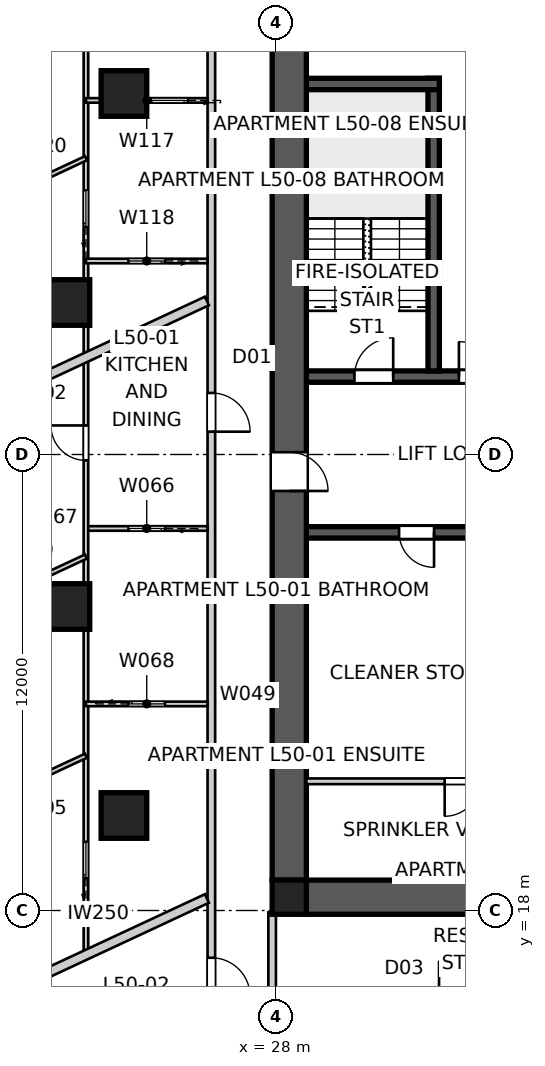
"""IFC4 building model, lengths in metres.
Left out: names, types, materials, properties, quantities, classifications, styles, units other than length and angle.
Written with IfcOpenShell. Run it as: python <this file> out.ifc"""

import sys

from ifc_helpers import new_model, si_unit, direction, frame, frame_2d, origin, origin_2d, place, context, subcontext, project, spatial, polyline, rectangle, outline, extrude, element, fill, save


model = new_model("IFC4")
c1 = context("Model", 3, precision=1e-05, world=origin(), true_north=direction((0.0, 1.0)))
c2 = subcontext(c1, "Body", "Model", "MODEL_VIEW")
j1 = project(units=[si_unit("LENGTHUNIT", "METRE"), si_unit("PLANEANGLEUNIT", "RADIAN")], contexts=[c1])
p1 = place(None, origin())
s1 = spatial("IfcSite", under=j1, at=p1, CompositionType="ELEMENT")
p2 = place(p1, origin())
s2 = spatial("IfcBuilding", under=s1, at=p2, CompositionType="ELEMENT")
p3 = place(p2, frame((0.0, 0.0, 182.8)))
s3 = spatial("IfcBuildingStorey", under=s2, at=p3, CompositionType="ELEMENT", Elevation=182.8)
p4 = place(p3, frame((51.2, 18.35, 0.0), z_axis=(0.0, 0.0, 1.0), x_axis=(-1.0, 0.0, 0.0)))
e1 = element("IfcWall", 1, at=p4, inside=s3, PredefinedType="SHEAR", context=c2, shape_type="SweptSolid", body=[
    extrude(outline(polyline([(0.0, -0.45), (22.4, -0.45), (22.4, -0.025), (22.85, -0.025), (22.85, 0.025), (22.4, 0.025), (22.4, 0.45), (0.0, 0.45), (0.0, 0.025), (-0.45, 0.025), (-0.45, -0.025), (0.0, -0.025), (0.0, -0.45)])), origin(), (0.0, 0.0, 1.0), 3.4),
])
p5 = place(p3, frame((28.35, 41.2, 0.0), z_axis=(0.0, 0.0, 1.0), x_axis=(0.0, -1.0, 0.0)))
e2 = element("IfcWall", 2, at=p5, inside=s3, PredefinedType="SHEAR", context=c2, shape_type="SweptSolid", body=[
    extrude(outline(polyline([(0.0, -0.45), (22.4, -0.45), (22.4, -0.025), (22.85, -0.025), (22.85, 0.025), (22.4, 0.025), (22.4, 0.45), (0.0, 0.45), (0.0, 0.025), (-0.45, 0.025), (-0.45, -0.025), (0.0, -0.025), (0.0, -0.45)])), origin(), (0.0, 0.0, 1.0), 3.4),
])
p6 = place(p5, frame((11.14, 0.0, 0.0)))
e3 = element("IfcOpeningElement", 3, at=p6, cuts=e2, PredefinedType="OPENING", context=c2, shape_type="SweptSolid", body=[
    extrude(rectangle(XDim=1.02, YDim=2.4, at=frame_2d((0.51, 1.2))), frame((0.0, 0.46, 0.0), z_axis=(0.0, -1.0, 0.0), x_axis=(1.0, 0.0, 0.0)), (0.0, 0.0, 1.0), 0.92),
])
p7 = place(p3, frame((28.8, 32.05, 0.0), z_axis=(0.0, 0.0, 1.0), x_axis=(1.0, 0.0, 0.0)))
e4 = element("IfcWall", 4, at=p7, inside=s3, PredefinedType="SHEAR", context=c2, shape_type="SweptSolid", body=[
    extrude(rectangle(XDim=22.4, YDim=0.3, at=frame_2d((11.2, 0.0))), origin(), (0.0, 0.0, 1.0), 3.4),
])
p8 = place(p7, frame((19.04, 0.0, 0.0)))
e5 = element("IfcOpeningElement", 5, at=p8, cuts=e4, PredefinedType="OPENING", context=c2, shape_type="SweptSolid", body=[
    extrude(rectangle(XDim=0.92, YDim=2.1, at=frame_2d((0.46, 1.05))), frame((0.0, 0.16, 0.0), z_axis=(0.0, -1.0, 0.0), x_axis=(1.0, 0.0, 0.0)), (0.0, 0.0, 1.0), 0.32),
])
p9 = place(p7, frame((1.265, 0.0, 0.0)))
e6 = element("IfcOpeningElement", 6, at=p9, cuts=e4, PredefinedType="OPENING", context=c2, shape_type="SweptSolid", body=[
    extrude(rectangle(XDim=1.02, YDim=2.1, at=frame_2d((0.51, 1.05))), frame((0.0, 0.16, 0.0), z_axis=(0.0, -1.0, 0.0), x_axis=(1.0, 0.0, 0.0)), (0.0, 0.0, 1.0), 0.32),
])
p10 = place(p7, frame((4.015, 0.0, 0.0)))
e7 = element("IfcOpeningElement", 7, at=p10, cuts=e4, PredefinedType="OPENING", context=c2, shape_type="SweptSolid", body=[
    extrude(rectangle(XDim=0.92, YDim=2.1, at=frame_2d((0.46, 1.05))), frame((0.0, 0.16, 0.0), z_axis=(0.0, -1.0, 0.0), x_axis=(1.0, 0.0, 0.0)), (0.0, 0.0, 1.0), 0.32),
])
p11 = place(p7, frame((7.015, 0.0, 0.0)))
e8 = element("IfcOpeningElement", 8, at=p11, cuts=e4, PredefinedType="OPENING", context=c2, shape_type="SweptSolid", body=[
    extrude(rectangle(XDim=0.92, YDim=2.1, at=frame_2d((0.46, 1.05))), frame((0.0, 0.16, 0.0), z_axis=(0.0, -1.0, 0.0), x_axis=(1.0, 0.0, 0.0)), (0.0, 0.0, 1.0), 0.32),
])
p12 = place(p7, frame((9.34, 0.0, 0.0)))
e9 = element("IfcOpeningElement", 9, at=p12, cuts=e4, PredefinedType="OPENING", context=c2, shape_type="SweptSolid", body=[
    extrude(rectangle(XDim=0.92, YDim=2.1, at=frame_2d((0.46, 1.05))), frame((0.0, 0.16, 0.0), z_axis=(0.0, -1.0, 0.0), x_axis=(1.0, 0.0, 0.0)), (0.0, 0.0, 1.0), 0.32),
])
p13 = place(p7, frame((14.85, 0.0, 0.0)))
e10 = element("IfcOpeningElement", 10, at=p13, cuts=e4, PredefinedType="OPENING", context=c2, shape_type="SweptSolid", body=[
    extrude(rectangle(XDim=1.1, YDim=2.1, at=frame_2d((0.55, 1.05))), frame((0.0, 0.16, 0.0), z_axis=(0.0, -1.0, 0.0), x_axis=(1.0, 0.0, 0.0)), (0.0, 0.0, 1.0), 0.32),
])
p14 = place(p3, frame((51.2, 27.95, 0.0), z_axis=(0.0, 0.0, 1.0), x_axis=(-1.0, 0.0, 0.0)))
e11 = element("IfcWall", 11, at=p14, inside=s3, PredefinedType="SHEAR", context=c2, shape_type="SweptSolid", body=[
    extrude(rectangle(XDim=22.4, YDim=0.3, at=frame_2d((11.2, 0.0))), origin(), (0.0, 0.0, 1.0), 3.4),
])
p15 = place(p14, frame((19.04, 0.0, 0.0)))
e12 = element("IfcOpeningElement", 12, at=p15, cuts=e11, PredefinedType="OPENING", context=c2, shape_type="SweptSolid", body=[
    extrude(rectangle(XDim=0.92, YDim=2.1, at=frame_2d((0.46, 1.05))), frame((0.0, 0.16, 0.0), z_axis=(0.0, -1.0, 0.0), x_axis=(1.0, 0.0, 0.0)), (0.0, 0.0, 1.0), 0.32),
])
p16 = place(p14, frame((1.265, 0.0, 0.0)))
e13 = element("IfcOpeningElement", 13, at=p16, cuts=e11, PredefinedType="OPENING", context=c2, shape_type="SweptSolid", body=[
    extrude(rectangle(XDim=1.02, YDim=2.1, at=frame_2d((0.51, 1.05))), frame((0.0, 0.16, 0.0), z_axis=(0.0, -1.0, 0.0), x_axis=(1.0, 0.0, 0.0)), (0.0, 0.0, 1.0), 0.32),
])
p17 = place(p14, frame((4.015, 0.0, 0.0)))
e14 = element("IfcOpeningElement", 14, at=p17, cuts=e11, PredefinedType="OPENING", context=c2, shape_type="SweptSolid", body=[
    extrude(rectangle(XDim=0.92, YDim=2.1, at=frame_2d((0.46, 1.05))), frame((0.0, 0.16, 0.0), z_axis=(0.0, -1.0, 0.0), x_axis=(1.0, 0.0, 0.0)), (0.0, 0.0, 1.0), 0.32),
])
p18 = place(p14, frame((6.45, 0.0, 0.0)))
e15 = element("IfcOpeningElement", 15, at=p18, cuts=e11, PredefinedType="OPENING", context=c2, shape_type="SweptSolid", body=[
    extrude(rectangle(XDim=1.1, YDim=2.1, at=frame_2d((0.55, 1.05))), frame((0.0, 0.16, 0.0), z_axis=(0.0, -1.0, 0.0), x_axis=(1.0, 0.0, 0.0)), (0.0, 0.0, 1.0), 0.32),
])
p19 = place(p14, frame((9.25, 0.0, 0.0)))
e16 = element("IfcOpeningElement", 16, at=p19, cuts=e11, PredefinedType="OPENING", context=c2, shape_type="SweptSolid", body=[
    extrude(rectangle(XDim=1.1, YDim=2.1, at=frame_2d((0.55, 1.05))), frame((0.0, 0.16, 0.0), z_axis=(0.0, -1.0, 0.0), x_axis=(1.0, 0.0, 0.0)), (0.0, 0.0, 1.0), 0.32),
])
p20 = place(p14, frame((14.85, 0.0, 0.0)))
e17 = element("IfcOpeningElement", 17, at=p20, cuts=e11, PredefinedType="OPENING", context=c2, shape_type="SweptSolid", body=[
    extrude(rectangle(XDim=1.1, YDim=2.1, at=frame_2d((0.55, 1.05))), frame((0.0, 0.16, 0.0), z_axis=(0.0, -1.0, 0.0), x_axis=(1.0, 0.0, 0.0)), (0.0, 0.0, 1.0), 0.32),
])
p21 = place(p3, frame((32.15, 32.2, 0.0), z_axis=(0.0, 0.0, 1.0), x_axis=(0.0, 1.0, 0.0)))
e18 = element("IfcWall", 18, at=p21, inside=s3, PredefinedType="SHEAR", context=c2, shape_type="SweptSolid", body=[
    extrude(rectangle(XDim=7.7, YDim=0.3, at=frame_2d((3.85, 0.0))), origin(), (0.0, 0.0, 1.0), 3.4),
])
p22 = place(p3, frame((28.8, 39.75, 0.0), z_axis=(0.0, 0.0, 1.0), x_axis=(1.0, 0.0, 0.0)))
e19 = element("IfcWall", 19, at=p22, inside=s3, PredefinedType="SHEAR", context=c2, shape_type="SweptSolid", body=[
    extrude(rectangle(XDim=3.5, YDim=0.3, at=frame_2d((1.75, 0.0))), origin(), (0.0, 0.0, 1.0), 3.4),
])
p23 = place(p3, frame((28.35, 18.35, 0.0), z_axis=(0.0, 0.0, 1.0), x_axis=(1.0, 0.0, 0.0)))
e20 = element("IfcColumn", 20, at=p23, inside=s3, PredefinedType="COLUMN", context=c2, shape_type="SweptSolid", body=[
    extrude(rectangle(XDim=0.9, YDim=0.9, at=origin_2d()), origin(), (0.0, 0.0, 1.0), 3.4),
])
for number, where, z_axis, x_axis in (
    (21, (24.0, 39.5, 0.0), (0.0, 0.0, 1.0), (1.0, 0.0, 0.0)),
    (22, (22.5, 34.0, 0.0), (0.0, 0.0, 1.0), (1.0, 0.0, 0.0)),
    (23, (22.5, 26.0, 0.0), (0.0, 0.0, 1.0), (1.0, 0.0, 0.0)),
    (24, (24.0, 20.5, 0.0), (0.0, 0.0, 1.0), (1.0, 0.0, 0.0)),
):
    element("IfcColumn", number, at=place(p3, frame(where, z_axis=z_axis, x_axis=x_axis)), inside=s3, PredefinedType="COLUMN", context=c2, shape_type="SweptSolid", body=[
        extrude(rectangle(XDim=1.2, YDim=1.2, at=origin_2d()), origin(), (0.0, 0.0, 1.0), 3.4),
    ])
p24 = place(p3, frame((26.3, 46.3, 0.0), z_axis=(0.0, 0.0, 1.0), x_axis=(0.0, -1.0, 0.0)))
e25 = element("IfcWall", 25, at=p24, inside=s3, PredefinedType="PARTITIONING", context=c2, shape_type="SweptSolid", body=[
    extrude(rectangle(XDim=32.6, YDim=0.2, at=frame_2d((16.3, 0.0))), origin(), (0.0, 0.0, 1.0), 3.25),
])
p25 = place(p24, frame((3.156, 0.0, 0.0)))
e26 = element("IfcOpeningElement", 26, at=p25, cuts=e25, PredefinedType="OPENING", context=c2, shape_type="SweptSolid", body=[
    extrude(rectangle(XDim=1.02, YDim=2.1, at=frame_2d((0.51, 1.05))), frame((0.0, 0.11, 0.0), z_axis=(0.0, -1.0, 0.0), x_axis=(1.0, 0.0, 0.0)), (0.0, 0.0, 1.0), 0.22),
])
p26 = place(p24, frame((14.68, 0.0, 0.0)))
e27 = element("IfcOpeningElement", 27, at=p26, cuts=e25, PredefinedType="OPENING", context=c2, shape_type="SweptSolid", body=[
    extrude(rectangle(XDim=1.02, YDim=2.34, at=frame_2d((0.51, 1.17))), frame((0.0, 0.11, 0.0), z_axis=(0.0, -1.0, 0.0), x_axis=(1.0, 0.0, 0.0)), (0.0, 0.0, 1.0), 0.22),
])
p27 = place(p24, frame((29.543, 0.0, 0.0)))
e28 = element("IfcOpeningElement", 28, at=p27, cuts=e25, PredefinedType="OPENING", context=c2, shape_type="SweptSolid", body=[
    extrude(rectangle(XDim=1.02, YDim=2.34, at=frame_2d((0.51, 1.17))), frame((0.0, 0.11, 0.0), z_axis=(0.0, -1.0, 0.0), x_axis=(1.0, 0.0, 0.0)), (0.0, 0.0, 1.0), 0.22),
])
p28 = place(p3, frame((15.14, 28.89, 0.0), z_axis=(0.0, 0.0, 1.0), x_axis=(0.906303906082, 0.422626584374, 0.0)))
e29 = element("IfcWall", 29, at=p28, inside=s3, PredefinedType="PARTITIONING", context=c2, shape_type="SweptSolid", body=[
    extrude(rectangle(XDim=12.185, YDim=0.25, at=frame_2d((6.092, 0.0))), origin(), (0.0, 0.0, 1.0), 3.25),
])
p29 = place(p3, frame((21.162, 15.975, 0.0), z_axis=(0.0, 0.0, 1.0), x_axis=(0.906309193024, 0.422615246577, 0.0)))
e30 = element("IfcWall", 30, at=p29, inside=s3, PredefinedType="PARTITIONING", context=c2, shape_type="SweptSolid", body=[
    extrude(rectangle(XDim=5.54, YDim=0.25, at=frame_2d((2.77, 0.0))), origin(), (0.0, 0.0, 1.0), 3.25),
])
p30 = place(p3, frame((37.0, 21.4, 0.0), z_axis=(0.0, 0.0, 1.0), x_axis=(-1.0, 0.0, 0.0)))
e31 = element("IfcWall", 31, at=p30, inside=s3, PredefinedType="SOLIDWALL", context=c2, shape_type="SweptSolid", body=[
    extrude(rectangle(XDim=8.2, YDim=0.15, at=frame_2d((4.1, 0.0))), origin(), (0.0, 0.0, 1.0), 3.25),
])
p31 = place(p30, frame((3.64, 0.0, 0.0)))
e32 = element("IfcOpeningElement", 32, at=p31, cuts=e31, PredefinedType="OPENING", context=c2, shape_type="SweptSolid", body=[
    extrude(rectangle(XDim=0.92, YDim=2.1, at=frame_2d((0.46, 1.05))), frame((0.0, 0.085, 0.0), z_axis=(0.0, -1.0, 0.0), x_axis=(1.0, 0.0, 0.0)), (0.0, 0.0, 1.0), 0.17),
])
p32 = place(p3, frame((27.9, 17.95, 0.0), z_axis=(0.0, 0.0, 1.0), x_axis=(0.0, -1.0, 0.0)))
e33 = element("IfcWall", 33, at=p32, inside=s3, PredefinedType="PARTITIONING", context=c2, shape_type="SweptSolid", body=[
    extrude(rectangle(XDim=2.3, YDim=0.2, at=frame_2d((1.15, 0.0))), origin(), (0.0, 0.0, 1.0), 3.25),
])
p33 = place(p3, frame((26.2, 28.054, 0.0), z_axis=(0.0, 0.0, 1.0), x_axis=(-1.0, 0.0, 0.0)))
e34 = element("IfcWall", 34, at=p33, inside=s3, PredefinedType="PARTITIONING", context=c2, shape_type="SweptSolid", body=[
    extrude(rectangle(XDim=3.2, YDim=0.12, at=frame_2d((1.6, 0.0))), origin(), (0.0, 0.0, 1.0), 3.25),
])
p34 = place(p33, frame((1.12, 0.0, 0.0)))
e35 = element("IfcOpeningElement", 35, at=p34, cuts=e34, PredefinedType="OPENING", context=c2, shape_type="SweptSolid", body=[
    extrude(rectangle(XDim=0.96, YDim=2.1, at=frame_2d((0.48, 1.05))), frame((0.0, 0.07, 0.0), z_axis=(0.0, -1.0, 0.0), x_axis=(1.0, 0.0, 0.0)), (0.0, 0.0, 1.0), 0.14),
])
p35 = place(p3, frame((23.0, 16.832, 0.0), z_axis=(0.0, 0.0, 1.0), x_axis=(0.0, 1.0, 0.0)))
e36 = element("IfcWall", 36, at=p35, inside=s3, PredefinedType="PARTITIONING", context=c2, shape_type="SweptSolid", body=[
    extrude(rectangle(XDim=30.574, YDim=0.12, at=frame_2d((15.287, 0.0))), origin(), (0.0, 0.0, 1.0), 2.55),
])
p36 = place(p35, frame((26.093, 0.0, 0.0)))
e37 = element("IfcOpeningElement", 37, at=p36, cuts=e36, PredefinedType="OPENING", context=c2, shape_type="SweptSolid", body=[
    extrude(rectangle(XDim=0.92, YDim=2.34, at=frame_2d((0.46, 1.17))), frame((0.0, 0.07, 0.0), z_axis=(0.0, -1.0, 0.0), x_axis=(1.0, 0.0, 0.0)), (0.0, 0.0, 1.0), 0.14),
])
p37 = place(p35, frame((13.012, 0.0, 0.0)))
e38 = element("IfcOpeningElement", 38, at=p37, cuts=e36, PredefinedType="OPENING", context=c2, shape_type="SweptSolid", body=[
    extrude(rectangle(XDim=0.92, YDim=2.34, at=frame_2d((0.46, 1.17))), frame((0.0, 0.07, 0.0), z_axis=(0.0, -1.0, 0.0), x_axis=(1.0, 0.0, 0.0)), (0.0, 0.0, 1.0), 0.14),
])
p38 = place(p35, frame((19.16, 0.0, 0.0)))
e39 = element("IfcOpeningElement", 39, at=p38, cuts=e36, PredefinedType="OPENING", context=c2, shape_type="SweptSolid", body=[
    extrude(rectangle(XDim=0.96, YDim=2.1, at=frame_2d((0.48, 1.05))), frame((0.0, 0.07, 0.0), z_axis=(0.0, -1.0, 0.0), x_axis=(1.0, 0.0, 0.0)), (0.0, 0.0, 1.0), 0.14),
])
p39 = place(p35, frame((2.018, 0.0, 0.0)))
e40 = element("IfcOpeningElement", 40, at=p39, cuts=e36, PredefinedType="OPENING", context=c2, shape_type="SweptSolid", body=[
    extrude(rectangle(XDim=0.96, YDim=2.1, at=frame_2d((0.48, 1.05))), frame((0.0, 0.07, 0.0), z_axis=(0.0, -1.0, 0.0), x_axis=(1.0, 0.0, 0.0)), (0.0, 0.0, 1.0), 0.14),
])
p40 = place(p3, frame((23.0, 23.436, 0.0), z_axis=(0.0, 0.0, 1.0), x_axis=(1.0, 0.0, 0.0)))
e41 = element("IfcWall", 41, at=p40, inside=s3, PredefinedType="PARTITIONING", context=c2, shape_type="SweptSolid", body=[
    extrude(rectangle(XDim=3.2, YDim=0.12, at=frame_2d((1.6, 0.0))), origin(), (0.0, 0.0, 1.0), 3.25),
])
p41 = place(p40, frame((1.12, 0.0, 0.0)))
e42 = element("IfcOpeningElement", 42, at=p41, cuts=e41, PredefinedType="OPENING", context=c2, shape_type="SweptSolid", body=[
    extrude(rectangle(XDim=0.96, YDim=2.1, at=frame_2d((0.48, 1.05))), frame((0.0, 0.07, 0.0), z_axis=(0.0, -1.0, 0.0), x_axis=(1.0, 0.0, 0.0)), (0.0, 0.0, 1.0), 0.14),
])
p42 = place(p3, frame((23.0, 27.314, 0.0), z_axis=(0.0, 0.0, 1.0), x_axis=(-0.906305562553, -0.422623032129, 0.0)))
e43 = element("IfcWall", 43, at=p42, inside=s3, PredefinedType="PARTITIONING", context=c2, shape_type="SweptSolid", body=[
    extrude(rectangle(XDim=6.417, YDim=0.12, at=frame_2d((3.209, 0.0))), origin(), (0.0, 0.0, 1.0), 3.25),
])
p43 = place(p42, frame((2.769, 0.0, 0.0)))
e44 = element("IfcOpeningElement", 44, at=p43, cuts=e43, PredefinedType="OPENING", context=c2, shape_type="SweptSolid", body=[
    extrude(rectangle(XDim=0.92, YDim=2.34, at=frame_2d((0.46, 1.17))), frame((0.0, 0.07, 0.0), z_axis=(0.0, -1.0, 0.0), x_axis=(1.0, 0.0, 0.0)), (0.0, 0.0, 1.0), 0.14),
])
p44 = place(p3, frame((23.0, 22.073, 0.0), z_axis=(0.0, 0.0, 1.0), x_axis=(-0.906304800396, -0.422624666552, 0.0)))
e45 = element("IfcWall", 45, at=p44, inside=s3, PredefinedType="PARTITIONING", context=c2, shape_type="SweptSolid", body=[
    extrude(rectangle(XDim=4.203, YDim=0.12, at=frame_2d((2.101, 0.0))), origin(), (0.0, 0.0, 1.0), 3.25),
])
p45 = place(p3, frame((26.2, 39.318, 0.0), z_axis=(0.0, 0.0, 1.0), x_axis=(-1.0, 0.0, 0.0)))
e46 = element("IfcWall", 46, at=p45, inside=s3, PredefinedType="PARTITIONING", context=c2, shape_type="SweptSolid", body=[
    extrude(rectangle(XDim=3.2, YDim=0.12, at=frame_2d((1.6, 0.0))), origin(), (0.0, 0.0, 1.0), 3.25),
])
p46 = place(p45, frame((0.52, 0.0, 0.0)))
e47 = element("IfcOpeningElement", 47, at=p46, cuts=e46, PredefinedType="OPENING", context=c2, shape_type="SweptSolid", body=[
    extrude(rectangle(XDim=0.96, YDim=2.1, at=frame_2d((0.48, 1.05))), frame((0.0, 0.07, 0.0), z_axis=(0.0, -1.0, 0.0), x_axis=(1.0, 0.0, 0.0)), (0.0, 0.0, 1.0), 0.14),
])
p47 = place(p3, frame((26.2, 35.092, 0.0), z_axis=(0.0, 0.0, 1.0), x_axis=(-1.0, 0.0, 0.0)))
e48 = element("IfcWall", 48, at=p47, inside=s3, PredefinedType="PARTITIONING", context=c2, shape_type="SweptSolid", body=[
    extrude(rectangle(XDim=3.2, YDim=0.12, at=frame_2d((1.6, 0.0))), origin(), (0.0, 0.0, 1.0), 3.25),
])
p48 = place(p47, frame((1.12, 0.0, 0.0)))
e49 = element("IfcOpeningElement", 49, at=p48, cuts=e48, PredefinedType="OPENING", context=c2, shape_type="SweptSolid", body=[
    extrude(rectangle(XDim=0.96, YDim=2.1, at=frame_2d((0.48, 1.05))), frame((0.0, 0.07, 0.0), z_axis=(0.0, -1.0, 0.0), x_axis=(1.0, 0.0, 0.0)), (0.0, 0.0, 1.0), 0.14),
])
p49 = place(p3, frame((21.072, 36.897, 0.0), z_axis=(0.0, 0.0, 1.0), x_axis=(0.90630329877, 0.422627886727, 0.0)))
e50 = element("IfcWall", 50, at=p49, inside=s3, PredefinedType="PARTITIONING", context=c2, shape_type="SweptSolid", body=[
    extrude(rectangle(XDim=2.128, YDim=0.12, at=frame_2d((1.064, 0.0))), origin(), (0.0, 0.0, 1.0), 3.25),
])
p50 = place(p15, origin())
e51 = element("IfcDoor", 51, at=p50, inside=s3, OperationType="SINGLE_SWING_LEFT", PredefinedType="DOOR", context=c2, shape_type="SweptSolid", body=[
    extrude(rectangle(XDim=0.92, YDim=2.1, at=frame_2d((0.46, 1.05))), frame((0.0, 0.025, 0.0), z_axis=(0.0, -1.0, 0.0), x_axis=(1.0, 0.0, 0.0)), (0.0, 0.0, 1.0), 0.05),
])
fill(e12, e51)
p51 = place(p9, origin())
e52 = element("IfcDoor", 52, at=p51, inside=s3, OperationType="SINGLE_SWING_RIGHT", PredefinedType="DOOR", context=c2, shape_type="SweptSolid", body=[
    extrude(rectangle(XDim=1.02, YDim=2.1, at=frame_2d((0.51, 1.05))), frame((0.0, 0.025, 0.0), z_axis=(0.0, -1.0, 0.0), x_axis=(1.0, 0.0, 0.0)), (0.0, 0.0, 1.0), 0.05),
])
fill(e6, e52)
p52 = place(p10, origin())
e53 = element("IfcDoor", 53, at=p52, inside=s3, OperationType="SINGLE_SWING_LEFT", PredefinedType="DOOR", context=c2, shape_type="SweptSolid", body=[
    extrude(rectangle(XDim=0.92, YDim=2.1, at=frame_2d((0.46, 1.05))), frame((0.0, 0.025, 0.0), z_axis=(0.0, -1.0, 0.0), x_axis=(1.0, 0.0, 0.0)), (0.0, 0.0, 1.0), 0.05),
])
fill(e7, e53)
p53 = place(p26, origin())
e54 = element("IfcDoor", 54, at=p53, inside=s3, OperationType="SINGLE_SWING_RIGHT", PredefinedType="DOOR", context=c2, shape_type="SweptSolid", body=[
    extrude(rectangle(XDim=1.02, YDim=2.34, at=frame_2d((0.51, 1.17))), frame((0.0, 0.025, 0.0), z_axis=(0.0, -1.0, 0.0), x_axis=(1.0, 0.0, 0.0)), (0.0, 0.0, 1.0), 0.05),
])
fill(e27, e54)
p54 = place(p27, origin())
e55 = element("IfcDoor", 55, at=p54, inside=s3, OperationType="SINGLE_SWING_RIGHT", PredefinedType="DOOR", context=c2, shape_type="SweptSolid", body=[
    extrude(rectangle(XDim=1.02, YDim=2.34, at=frame_2d((0.51, 1.17))), frame((0.0, 0.025, 0.0), z_axis=(0.0, -1.0, 0.0), x_axis=(1.0, 0.0, 0.0)), (0.0, 0.0, 1.0), 0.05),
])
fill(e28, e55)
p55 = place(p31, origin())
e56 = element("IfcDoor", 56, at=p55, inside=s3, OperationType="SINGLE_SWING_RIGHT", PredefinedType="DOOR", context=c2, shape_type="SweptSolid", body=[
    extrude(rectangle(XDim=0.92, YDim=2.1, at=frame_2d((0.46, 1.05))), frame((0.0, 0.025, 0.0), z_axis=(0.0, -1.0, 0.0), x_axis=(1.0, 0.0, 0.0)), (0.0, 0.0, 1.0), 0.05),
])
fill(e32, e56)
p56 = place(p46, origin())
e57 = element("IfcDoor", 57, at=p56, inside=s3, OperationType="SLIDING_TO_LEFT", PredefinedType="DOOR", context=c2, shape_type="SweptSolid", body=[
    extrude(rectangle(XDim=0.96, YDim=2.1, at=frame_2d((0.48, 1.05))), frame((0.0, 0.025, 0.0), z_axis=(0.0, -1.0, 0.0), x_axis=(1.0, 0.0, 0.0)), (0.0, 0.0, 1.0), 0.05),
])
fill(e47, e57)
p57 = place(p37, origin())
e58 = element("IfcDoor", 58, at=p57, inside=s3, OperationType="SINGLE_SWING_RIGHT", PredefinedType="DOOR", context=c2, shape_type="SweptSolid", body=[
    extrude(rectangle(XDim=0.92, YDim=2.34, at=frame_2d((0.46, 1.17))), frame((0.0, 0.025, 0.0), z_axis=(0.0, -1.0, 0.0), x_axis=(1.0, 0.0, 0.0)), (0.0, 0.0, 1.0), 0.05),
])
fill(e38, e58)
p58 = place(p34, origin())
e59 = element("IfcDoor", 59, at=p58, inside=s3, OperationType="SLIDING_TO_LEFT", PredefinedType="DOOR", context=c2, shape_type="SweptSolid", body=[
    extrude(rectangle(XDim=0.96, YDim=2.1, at=frame_2d((0.48, 1.05))), frame((0.0, 0.025, 0.0), z_axis=(0.0, -1.0, 0.0), x_axis=(1.0, 0.0, 0.0)), (0.0, 0.0, 1.0), 0.05),
])
fill(e35, e59)
p59 = place(p48, origin())
e60 = element("IfcDoor", 60, at=p59, inside=s3, OperationType="SLIDING_TO_LEFT", PredefinedType="DOOR", context=c2, shape_type="SweptSolid", body=[
    extrude(rectangle(XDim=0.96, YDim=2.1, at=frame_2d((0.48, 1.05))), frame((0.0, 0.025, 0.0), z_axis=(0.0, -1.0, 0.0), x_axis=(1.0, 0.0, 0.0)), (0.0, 0.0, 1.0), 0.05),
])
fill(e49, e60)
p60 = place(p38, origin())
e61 = element("IfcDoor", 61, at=p60, inside=s3, OperationType="SLIDING_TO_LEFT", PredefinedType="DOOR", context=c2, shape_type="SweptSolid", body=[
    extrude(rectangle(XDim=0.96, YDim=2.1, at=frame_2d((0.48, 1.05))), frame((0.0, 0.025, 0.0), z_axis=(0.0, -1.0, 0.0), x_axis=(1.0, 0.0, 0.0)), (0.0, 0.0, 1.0), 0.05),
])
fill(e39, e61)
p61 = place(p41, origin())
e62 = element("IfcDoor", 62, at=p61, inside=s3, OperationType="SLIDING_TO_LEFT", PredefinedType="DOOR", context=c2, shape_type="SweptSolid", body=[
    extrude(rectangle(XDim=0.96, YDim=2.1, at=frame_2d((0.48, 1.05))), frame((0.0, 0.025, 0.0), z_axis=(0.0, -1.0, 0.0), x_axis=(1.0, 0.0, 0.0)), (0.0, 0.0, 1.0), 0.05),
])
fill(e42, e62)
p62 = place(p39, origin())
e63 = element("IfcDoor", 63, at=p62, inside=s3, OperationType="SLIDING_TO_LEFT", PredefinedType="DOOR", context=c2, shape_type="SweptSolid", body=[
    extrude(rectangle(XDim=0.96, YDim=2.1, at=frame_2d((0.48, 1.05))), frame((0.0, 0.025, 0.0), z_axis=(0.0, -1.0, 0.0), x_axis=(1.0, 0.0, 0.0)), (0.0, 0.0, 1.0), 0.05),
])
fill(e40, e63)
p63 = place(p6, origin())
e64 = element("IfcDoor", 64, at=p63, inside=s3, OperationType="SINGLE_SWING_RIGHT", PredefinedType="DOOR", context=c2, shape_type="SweptSolid", body=[
    extrude(rectangle(XDim=1.02, YDim=2.4, at=frame_2d((0.51, 1.2))), frame((0.0, 0.025, 0.0), z_axis=(0.0, -1.0, 0.0), x_axis=(1.0, 0.0, 0.0)), (0.0, 0.0, 1.0), 0.05),
])
fill(e3, e64)
save(model, sys.argv[1])
